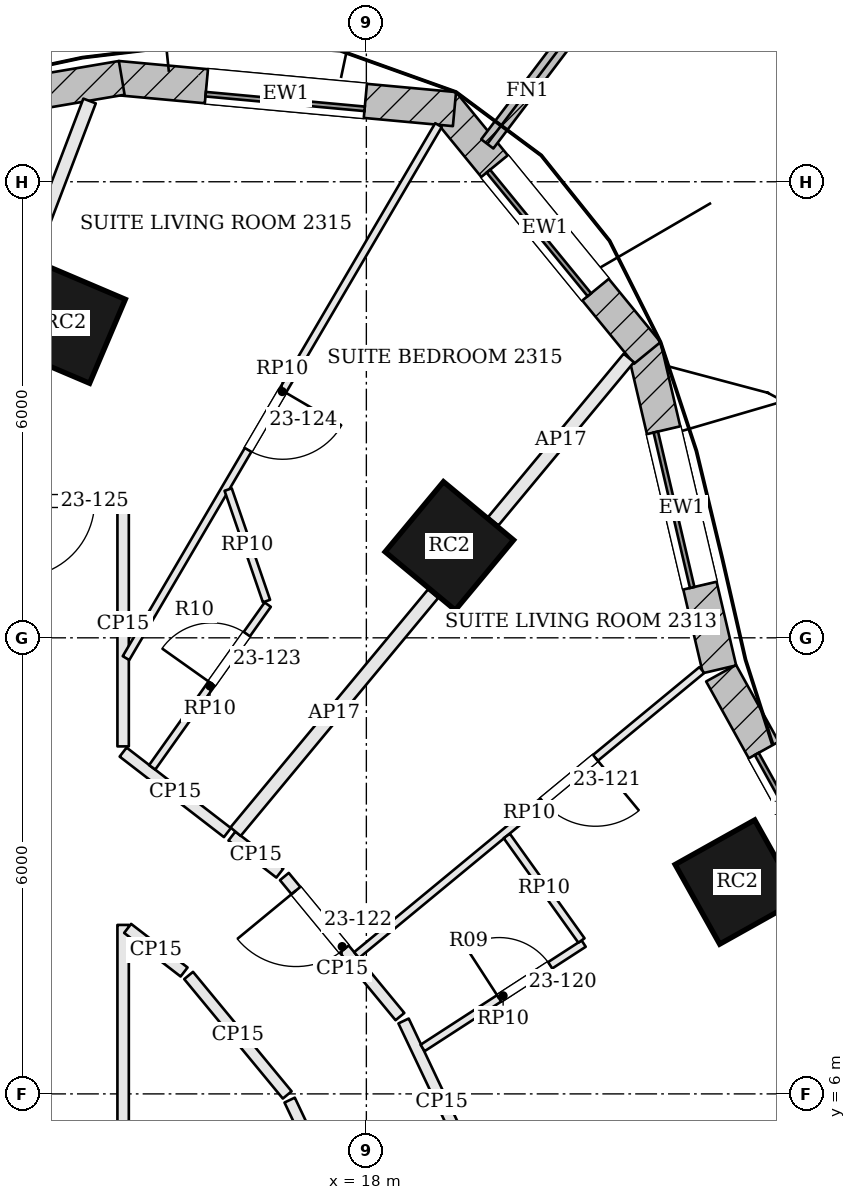
"""IFC4 building model, lengths in metres.
Left out: names, types, materials, properties, quantities, classifications, styles, units other than length and angle.
Written with IfcOpenShell. Run it as: python <this file> out.ifc"""

import sys

from ifc_helpers import new_model, si_unit, direction, frame, frame_2d, origin, origin_2d, place, context, subcontext, project, spatial, rectangle, extrude, element, fill, save


model = new_model("IFC4")
c1 = context("Model", 3, precision=1e-05, world=origin(), true_north=direction((0.0, 1.0)))
c2 = subcontext(c1, "Body", "Model", "MODEL_VIEW")
j1 = project(units=[si_unit("LENGTHUNIT", "METRE"), si_unit("PLANEANGLEUNIT", "RADIAN")], contexts=[c1])
p1 = place(None, origin())
s1 = spatial("IfcSite", under=j1, at=p1, CompositionType="ELEMENT")
p2 = place(p1, origin())
s2 = spatial("IfcBuilding", under=s1, at=p2, CompositionType="ELEMENT")
p3 = place(p2, frame((0.0, 0.0, 99.6)))
s3 = spatial("IfcBuildingStorey", under=s2, at=p3, CompositionType="ELEMENT", Elevation=99.6)
for number, where, z_axis, x_axis in (
    (1, (22.879, 8.787, 0.0), (0.0, 0.0, 1.0), (-0.489, 0.873, 0.0)),
    (2, (19.092, 13.209, 0.0), (0.0, 0.0, 1.0), (-0.769, 0.639, 0.0)),
    (3, (14.042, 16.136, 0.0), (0.0, 0.0, 1.0), (-0.92, 0.392, 0.0)),
):
    element("IfcColumn", number, at=place(p3, frame(where, z_axis=z_axis, x_axis=x_axis)), inside=s3, PredefinedType="COLUMN", context=c2, shape_type="SweptSolid", body=[
        extrude(rectangle(XDim=1.2, YDim=1.2, at=origin_2d()), origin(), (0.0, 0.0, 1.0), 3.6),
    ])
p4 = place(p3, frame((24.662, 7.939, 0.0), z_axis=(0.0, 0.0, 1.0), x_axis=(-0.485153910721, 0.874428775208, 0.0)))
e4 = element("IfcWall", 4, at=p4, inside=s3, PredefinedType="SOLIDWALL", context=c2, shape_type="SweptSolid", body=[
    extrude(rectangle(XDim=4.112, YDim=0.45, at=frame_2d((2.056, 0.0))), origin(), (0.0, 0.0, 1.0), 3.4),
])
p5 = place(p4, frame((1.156, 0.0, 0.9)))
e5 = element("IfcOpeningElement", 5, at=p5, cuts=e4, PredefinedType="OPENING", context=c2, shape_type="SweptSolid", body=[
    extrude(rectangle(XDim=1.8, YDim=2.0, at=frame_2d((0.9, 1.0))), frame((0.0, 0.235, 0.0), z_axis=(0.0, -1.0, 0.0), x_axis=(1.0, 0.0, 0.0)), (0.0, 0.0, 1.0), 0.47),
])
p6 = place(p3, frame((22.646, 11.586, 0.0), z_axis=(0.0, 0.0, 1.0), x_axis=(-0.227925124198, 0.973678662475, 0.0)))
e6 = element("IfcWall", 6, at=p6, inside=s3, PredefinedType="SOLIDWALL", context=c2, shape_type="SweptSolid", body=[
    extrude(rectangle(XDim=4.361, YDim=0.45, at=frame_2d((2.18, 0.0))), origin(), (0.0, 0.0, 1.0), 3.4),
])
p7 = place(p6, frame((1.13, 0.0, 0.9)))
e7 = element("IfcOpeningElement", 7, at=p7, cuts=e6, PredefinedType="OPENING", context=c2, shape_type="SweptSolid", body=[
    extrude(rectangle(XDim=2.1, YDim=2.0, at=frame_2d((1.05, 1.0))), frame((0.0, 0.235, 0.0), z_axis=(0.0, -1.0, 0.0), x_axis=(1.0, 0.0, 0.0)), (0.0, 0.0, 1.0), 0.47),
])
p8 = place(p3, frame((21.696, 15.748, 0.0), z_axis=(0.0, 0.0, 1.0), x_axis=(-0.632968710519, 0.774177377288, 0.0)))
e8 = element("IfcWall", 8, at=p8, inside=s3, PredefinedType="SOLIDWALL", context=c2, shape_type="SweptSolid", body=[
    extrude(rectangle(XDim=4.25, YDim=0.45, at=frame_2d((2.125, 0.0))), origin(), (0.0, 0.0, 1.0), 3.4),
])
p9 = place(p8, frame((1.075, 0.0, 0.9)))
e9 = element("IfcOpeningElement", 9, at=p9, cuts=e8, PredefinedType="OPENING", context=c2, shape_type="SweptSolid", body=[
    extrude(rectangle(XDim=2.1, YDim=2.0, at=frame_2d((1.05, 1.0))), frame((0.0, 0.235, 0.0), z_axis=(0.0, -1.0, 0.0), x_axis=(1.0, 0.0, 0.0)), (0.0, 0.0, 1.0), 0.47),
])
p10 = place(p3, frame((19.159, 18.956, 0.0), z_axis=(0.0, 0.0, 1.0), x_axis=(-0.995777399421, 0.091800712424, 0.0)))
e10 = element("IfcWall", 10, at=p10, inside=s3, PredefinedType="SOLIDWALL", context=c2, shape_type="SweptSolid", body=[
    extrude(rectangle(XDim=4.455, YDim=0.45, at=frame_2d((2.227, 0.0))), origin(), (0.0, 0.0, 1.0), 3.4),
])
p11 = place(p10, frame((1.177, 0.0, 0.9)))
e11 = element("IfcOpeningElement", 11, at=p11, cuts=e10, PredefinedType="OPENING", context=c2, shape_type="SweptSolid", body=[
    extrude(rectangle(XDim=2.1, YDim=2.0, at=frame_2d((1.05, 1.0))), frame((0.0, 0.235, 0.0), z_axis=(0.0, -1.0, 0.0), x_axis=(1.0, 0.0, 0.0)), (0.0, 0.0, 1.0), 0.47),
])
p12 = place(p3, frame((14.782, 19.367, 0.0), z_axis=(0.0, 0.0, 1.0), x_axis=(-0.98585584667, -0.167595493934, 0.0)))
e12 = element("IfcWall", 12, at=p12, inside=s3, PredefinedType="SOLIDWALL", context=c2, shape_type="SweptSolid", body=[
    extrude(rectangle(XDim=5.399, YDim=0.45, at=frame_2d((2.699, 0.0))), origin(), (0.0, 0.0, 1.0), 3.4),
])
p13 = place(p12, frame((1.649, 0.0, 0.9)))
e13 = element("IfcOpeningElement", 13, at=p13, cuts=e12, PredefinedType="OPENING", context=c2, shape_type="SweptSolid", body=[
    extrude(rectangle(XDim=2.1, YDim=2.0, at=frame_2d((1.05, 1.0))), frame((0.0, 0.235, 0.0), z_axis=(0.0, -1.0, 0.0), x_axis=(1.0, 0.0, 0.0)), (0.0, 0.0, 1.0), 0.47),
])
p14 = place(p3, frame((19.591, 18.498, 0.0), z_axis=(0.0, 0.0, 1.0), x_axis=(0.603387525063, 0.797448114048, 0.0)))
e14 = element("IfcWall", 14, at=p14, inside=s3, PredefinedType="SOLIDWALL", context=c2, shape_type="SweptSolid", body=[
    extrude(rectangle(XDim=1.75, YDim=0.2, at=frame_2d((0.875, 0.0))), origin(), (0.0, 0.0, 1.0), 3.4),
])
p15 = place(p3, frame((19.495, 4.836, 0.0), z_axis=(0.0, 0.0, 1.0), x_axis=(-0.428157819028, 0.903703979191, 0.0)))
e15 = element("IfcWall", 15, at=p15, inside=s3, PredefinedType="PARTITIONING", context=c2, shape_type="SweptSolid", body=[
    extrude(rectangle(XDim=2.349, YDim=0.15, at=frame_2d((1.175, 0.0))), origin(), (0.0, 0.0, 1.0), 2.784),
])
p16 = place(p3, frame((18.442, 7.017, 0.0), z_axis=(0.0, 0.0, 1.0), x_axis=(-0.636538018119, 0.7712453251, 0.0)))
e16 = element("IfcWall", 16, at=p16, inside=s3, PredefinedType="PARTITIONING", context=c2, shape_type="SweptSolid", body=[
    extrude(rectangle(XDim=2.389, YDim=0.15, at=frame_2d((1.194, 0.0))), origin(), (0.0, 0.0, 1.0), 2.784),
])
p17 = place(p16, frame((1.15, 0.0, 0.0)))
e17 = element("IfcOpeningElement", 17, at=p17, cuts=e16, PredefinedType="OPENING", context=c2, shape_type="SweptSolid", body=[
    extrude(rectangle(XDim=1.0, YDim=2.1, at=frame_2d((0.5, 1.05))), frame((0.0, 0.085, 0.0), z_axis=(0.0, -1.0, 0.0), x_axis=(1.0, 0.0, 0.0)), (0.0, 0.0, 1.0), 0.17),
])
p18 = place(p3, frame((16.862, 8.905, 0.0), z_axis=(0.0, 0.0, 1.0), x_axis=(-0.791460242133, 0.611220651748, 0.0)))
e18 = element("IfcWall", 18, at=p18, inside=s3, PredefinedType="PARTITIONING", context=c2, shape_type="SweptSolid", body=[
    extrude(rectangle(XDim=0.796, YDim=0.15, at=frame_2d((0.398, 0.0))), origin(), (0.0, 0.0, 1.0), 2.784),
])
p19 = place(p3, frame((21.453, 15.682, 0.0), z_axis=(0.0, 0.0, 1.0), x_axis=(-0.638728991457, -0.769431787407, 0.0)))
e19 = element("IfcWall", 19, at=p19, inside=s3, PredefinedType="PARTITIONING", context=c2, shape_type="SweptSolid", body=[
    extrude(rectangle(XDim=2.791, YDim=0.175, at=frame_2d((1.396, 0.0))), origin(), (0.0, 0.0, 1.0), 2.784),
])
p20 = place(p3, frame((18.878, 12.58, 0.0), z_axis=(0.0, 0.0, 1.0), x_axis=(-0.638737279584, -0.769424907102, 0.0)))
e20 = element("IfcWall", 20, at=p20, inside=s3, PredefinedType="PARTITIONING", context=c2, shape_type="SweptSolid", body=[
    extrude(rectangle(XDim=4.069, YDim=0.175, at=frame_2d((2.034, 0.0))), origin(), (0.0, 0.0, 1.0), 2.784),
])
p21 = place(p3, frame((16.172, 9.438, 0.0), z_axis=(0.0, 0.0, 1.0), x_axis=(-0.791607054889, 0.611030498952, 0.0)))
e21 = element("IfcWall", 21, at=p21, inside=s3, PredefinedType="PARTITIONING", context=c2, shape_type="SweptSolid", body=[
    extrude(rectangle(XDim=1.733, YDim=0.15, at=frame_2d((0.867, 0.0))), origin(), (0.0, 0.0, 1.0), 2.784),
])
p22 = place(p3, frame((14.8, 10.572, 0.0), z_axis=(0.0, 0.0, 1.0), x_axis=(0.0, 1.0, 0.0)))
e22 = element("IfcWall", 22, at=p22, inside=s3, PredefinedType="PARTITIONING", context=c2, shape_type="SweptSolid", body=[
    extrude(rectangle(XDim=3.228, YDim=0.15, at=frame_2d((1.614, 0.0))), origin(), (0.0, 0.0, 1.0), 2.784),
])
p23 = place(p3, frame((14.725, 13.8, 0.0), z_axis=(0.0, 0.0, 1.0), x_axis=(-1.0, 0.0, 0.0)))
e23 = element("IfcWall", 23, at=p23, inside=s3, PredefinedType="PARTITIONING", context=c2, shape_type="SweptSolid", body=[
    extrude(rectangle(XDim=2.37, YDim=0.15, at=frame_2d((1.185, 0.0))), origin(), (0.0, 0.0, 1.0), 2.784),
])
p24 = place(p23, frame((0.3, 0.0, 0.0)))
e24 = element("IfcOpeningElement", 24, at=p24, cuts=e23, PredefinedType="OPENING", context=c2, shape_type="SweptSolid", body=[
    extrude(rectangle(XDim=1.0, YDim=2.1, at=frame_2d((0.5, 1.05))), frame((0.0, 0.085, 0.0), z_axis=(0.0, -1.0, 0.0), x_axis=(1.0, 0.0, 0.0)), (0.0, 0.0, 1.0), 0.17),
])
p25 = place(p3, frame((14.359, 19.063, 0.0), z_axis=(0.0, 0.0, 1.0), x_axis=(-0.355746808742, -0.934582370939, 0.0)))
e25 = element("IfcWall", 25, at=p25, inside=s3, PredefinedType="PARTITIONING", context=c2, shape_type="SweptSolid", body=[
    extrude(rectangle(XDim=5.556, YDim=0.175, at=frame_2d((2.778, 0.0))), origin(), (0.0, 0.0, 1.0), 2.784),
])
p26 = place(p3, frame((15.662, 7.558, 0.0), z_axis=(0.0, 0.0, 1.0), x_axis=(0.636500564941, -0.7712762351, 0.0)))
e26 = element("IfcWall", 26, at=p26, inside=s3, PredefinedType="PARTITIONING", context=c2, shape_type="SweptSolid", body=[
    extrude(rectangle(XDim=2.038, YDim=0.15, at=frame_2d((1.019, 0.0))), origin(), (0.0, 0.0, 1.0), 2.784),
])
p27 = place(p3, frame((16.991, 5.918, 0.0), z_axis=(0.0, 0.0, 1.0), x_axis=(0.428199863362, -0.903684058185, 0.0)))
e27 = element("IfcWall", 27, at=p27, inside=s3, PredefinedType="PARTITIONING", context=c2, shape_type="SweptSolid", body=[
    extrude(rectangle(XDim=1.941, YDim=0.15, at=frame_2d((0.971, 0.0))), origin(), (0.0, 0.0, 1.0), 2.784),
])
p28 = place(p3, frame((14.8, -4.725, 0.0), z_axis=(0.0, 0.0, 1.0), x_axis=(0.0, 1.0, 0.0)))
e28 = element("IfcWall", 28, at=p28, inside=s3, PredefinedType="PARTITIONING", context=c2, shape_type="SweptSolid", body=[
    extrude(rectangle(XDim=12.948, YDim=0.15, at=frame_2d((6.474, 0.0))), origin(), (0.0, 0.0, 1.0), 2.784),
])
p29 = place(p28, frame((5.536, 0.0, 0.0)))
e29 = element("IfcOpeningElement", 29, at=p29, cuts=e28, PredefinedType="OPENING", context=c2, shape_type="SweptSolid", body=[
    extrude(rectangle(XDim=1.8, YDim=2.1, at=frame_2d((0.9, 1.05))), frame((0.0, 0.085, 0.0), z_axis=(0.0, -1.0, 0.0), x_axis=(1.0, 0.0, 0.0)), (0.0, 0.0, 1.0), 0.17),
])
p30 = place(p3, frame((14.859, 8.177, 0.0), z_axis=(0.0, 0.0, 1.0), x_axis=(0.791588113465, -0.611055037309, 0.0)))
e30 = element("IfcWall", 30, at=p30, inside=s3, PredefinedType="PARTITIONING", context=c2, shape_type="SweptSolid", body=[
    extrude(rectangle(XDim=0.938, YDim=0.15, at=frame_2d((0.469, 0.0))), origin(), (0.0, 0.0, 1.0), 2.784),
])
p31 = place(p3, frame((22.414, 11.576, 0.0), z_axis=(0.0, 0.0, 1.0), x_axis=(-0.77113161257, -0.636675769992, 0.0)))
e31 = element("IfcWall", 31, at=p31, inside=s3, PredefinedType="PARTITIONING", context=c2, shape_type="SweptSolid", body=[
    extrude(rectangle(XDim=5.89, YDim=0.1, at=frame_2d((2.945, 0.0))), origin(), (0.0, 0.0, 1.0), 2.784),
])
p32 = place(p31, frame((1.815, 0.0, 0.0)))
e32 = element("IfcOpeningElement", 32, at=p32, cuts=e31, PredefinedType="OPENING", context=c2, shape_type="SweptSolid", body=[
    extrude(rectangle(XDim=0.9, YDim=2.4, at=frame_2d((0.45, 1.2))), frame((0.0, 0.06, 0.0), z_axis=(0.0, -1.0, 0.0), x_axis=(1.0, 0.0, 0.0)), (0.0, 0.0, 1.0), 0.12),
])
p33 = place(p3, frame((18.74, 6.604, 0.0), z_axis=(0.0, 0.0, 1.0), x_axis=(0.839209373403, 0.543808447519, 0.0)))
e33 = element("IfcWall", 33, at=p33, inside=s3, PredefinedType="PARTITIONING", context=c2, shape_type="SweptSolid", body=[
    extrude(rectangle(XDim=2.525, YDim=0.1, at=frame_2d((1.262, 0.0))), origin(), (0.0, 0.0, 1.0), 2.784),
])
p34 = place(p33, frame((1.2, 0.0, 0.0)))
e34 = element("IfcOpeningElement", 34, at=p34, cuts=e33, PredefinedType="OPENING", context=c2, shape_type="SweptSolid", body=[
    extrude(rectangle(XDim=0.8, YDim=2.1, at=frame_2d((0.4, 1.05))), frame((0.0, 0.06, 0.0), z_axis=(0.0, -1.0, 0.0), x_axis=(1.0, 0.0, 0.0)), (0.0, 0.0, 1.0), 0.12),
])
p35 = place(p3, frame((20.83, 8.018, 0.0), z_axis=(0.0, 0.0, 1.0), x_axis=(-0.581347517166, 0.813655371939, 0.0)))
e35 = element("IfcWall", 35, at=p35, inside=s3, PredefinedType="PARTITIONING", context=c2, shape_type="SweptSolid", body=[
    extrude(rectangle(XDim=1.69, YDim=0.1, at=frame_2d((0.845, 0.0))), origin(), (0.0, 0.0, 1.0), 2.784),
])
p36 = place(p3, frame((18.949, 18.745, 0.0), z_axis=(0.0, 0.0, 1.0), x_axis=(-0.505754187447, -0.862677634972, 0.0)))
e36 = element("IfcWall", 36, at=p36, inside=s3, PredefinedType="PARTITIONING", context=c2, shape_type="SweptSolid", body=[
    extrude(rectangle(XDim=8.128, YDim=0.1, at=frame_2d((4.064, 0.0))), origin(), (0.0, 0.0, 1.0), 2.784),
])
p37 = place(p36, frame((4.053, 0.0, 0.0)))
e37 = element("IfcOpeningElement", 37, at=p37, cuts=e36, PredefinedType="OPENING", context=c2, shape_type="SweptSolid", body=[
    extrude(rectangle(XDim=0.9, YDim=2.4, at=frame_2d((0.45, 1.2))), frame((0.0, 0.06, 0.0), z_axis=(0.0, -1.0, 0.0), x_axis=(1.0, 0.0, 0.0)), (0.0, 0.0, 1.0), 0.12),
])
p38 = place(p3, frame((15.183, 10.296, 0.0), z_axis=(0.0, 0.0, 1.0), x_axis=(0.578992412459, 0.815332929738, 0.0)))
e38 = element("IfcWall", 38, at=p38, inside=s3, PredefinedType="PARTITIONING", context=c2, shape_type="SweptSolid", body=[
    extrude(rectangle(XDim=2.625, YDim=0.1, at=frame_2d((1.312, 0.0))), origin(), (0.0, 0.0, 1.0), 2.784),
])
p39 = place(p38, frame((1.35, 0.0, 0.0)))
e39 = element("IfcOpeningElement", 39, at=p39, cuts=e38, PredefinedType="OPENING", context=c2, shape_type="SweptSolid", body=[
    extrude(rectangle(XDim=0.8, YDim=2.1, at=frame_2d((0.4, 1.05))), frame((0.0, 0.06, 0.0), z_axis=(0.0, -1.0, 0.0), x_axis=(1.0, 0.0, 0.0)), (0.0, 0.0, 1.0), 0.12),
])
p40 = place(p3, frame((16.686, 12.484, 0.0), z_axis=(0.0, 0.0, 1.0), x_axis=(-0.325136945244, 0.94566694287, 0.0)))
e40 = element("IfcWall", 40, at=p40, inside=s3, PredefinedType="PARTITIONING", context=c2, shape_type="SweptSolid", body=[
    extrude(rectangle(XDim=1.551, YDim=0.1, at=frame_2d((0.776, 0.0))), origin(), (0.0, 0.0, 1.0), 2.784),
])
p41 = place(p5, origin())
e41 = element("IfcWindow", 41, at=p41, inside=s3, PartitioningType="SINGLE_PANEL", PredefinedType="WINDOW", context=c2, shape_type="SweptSolid", body=[
    extrude(rectangle(XDim=1.8, YDim=2.0, at=frame_2d((0.9, 1.0))), frame((0.0, 0.135, 0.0), z_axis=(0.0, -1.0, 0.0), x_axis=(1.0, 0.0, 0.0)), (0.0, 0.0, 1.0), 0.06),
])
fill(e5, e41)
p42 = place(p7, origin())
e42 = element("IfcWindow", 42, at=p42, inside=s3, PartitioningType="SINGLE_PANEL", PredefinedType="WINDOW", context=c2, shape_type="SweptSolid", body=[
    extrude(rectangle(XDim=2.1, YDim=2.0, at=frame_2d((1.05, 1.0))), frame((0.0, 0.135, 0.0), z_axis=(0.0, -1.0, 0.0), x_axis=(1.0, 0.0, 0.0)), (0.0, 0.0, 1.0), 0.06),
])
fill(e7, e42)
p43 = place(p9, origin())
e43 = element("IfcWindow", 43, at=p43, inside=s3, PartitioningType="SINGLE_PANEL", PredefinedType="WINDOW", context=c2, shape_type="SweptSolid", body=[
    extrude(rectangle(XDim=2.1, YDim=2.0, at=frame_2d((1.05, 1.0))), frame((0.0, 0.135, 0.0), z_axis=(0.0, -1.0, 0.0), x_axis=(1.0, 0.0, 0.0)), (0.0, 0.0, 1.0), 0.06),
])
fill(e9, e43)
p44 = place(p11, origin())
e44 = element("IfcWindow", 44, at=p44, inside=s3, PartitioningType="SINGLE_PANEL", PredefinedType="WINDOW", context=c2, shape_type="SweptSolid", body=[
    extrude(rectangle(XDim=2.1, YDim=2.0, at=frame_2d((1.05, 1.0))), frame((0.0, 0.135, 0.0), z_axis=(0.0, -1.0, 0.0), x_axis=(1.0, 0.0, 0.0)), (0.0, 0.0, 1.0), 0.06),
])
fill(e11, e44)
p45 = place(p34, origin())
e45 = element("IfcDoor", 45, at=p45, inside=s3, OperationType="SINGLE_SWING_LEFT", PredefinedType="DOOR", context=c2, shape_type="SweptSolid", body=[
    extrude(rectangle(XDim=0.8, YDim=2.1, at=frame_2d((0.4, 1.05))), frame((0.0, 0.025, 0.0), z_axis=(0.0, -1.0, 0.0), x_axis=(1.0, 0.0, 0.0)), (0.0, 0.0, 1.0), 0.05),
])
fill(e34, e45)
p46 = place(p32, origin())
e46 = element("IfcDoor", 46, at=p46, inside=s3, OperationType="SINGLE_SWING_LEFT", PredefinedType="DOOR", context=c2, shape_type="SweptSolid", body=[
    extrude(rectangle(XDim=0.9, YDim=2.4, at=frame_2d((0.45, 1.2))), frame((0.0, 0.025, 0.0), z_axis=(0.0, -1.0, 0.0), x_axis=(1.0, 0.0, 0.0)), (0.0, 0.0, 1.0), 0.05),
])
fill(e32, e46)
p47 = place(p17, origin())
e47 = element("IfcDoor", 47, at=p47, inside=s3, OperationType="SINGLE_SWING_RIGHT", PredefinedType="DOOR", context=c2, shape_type="SweptSolid", body=[
    extrude(rectangle(XDim=1.0, YDim=2.1, at=frame_2d((0.5, 1.05))), frame((0.0, 0.025, 0.0), z_axis=(0.0, -1.0, 0.0), x_axis=(1.0, 0.0, 0.0)), (0.0, 0.0, 1.0), 0.05),
])
fill(e17, e47)
p48 = place(p39, origin())
e48 = element("IfcDoor", 48, at=p48, inside=s3, OperationType="SINGLE_SWING_LEFT", PredefinedType="DOOR", context=c2, shape_type="SweptSolid", body=[
    extrude(rectangle(XDim=0.8, YDim=2.1, at=frame_2d((0.4, 1.05))), frame((0.0, 0.025, 0.0), z_axis=(0.0, -1.0, 0.0), x_axis=(1.0, 0.0, 0.0)), (0.0, 0.0, 1.0), 0.05),
])
fill(e39, e48)
p49 = place(p37, origin())
e49 = element("IfcDoor", 49, at=p49, inside=s3, OperationType="SINGLE_SWING_LEFT", PredefinedType="DOOR", context=c2, shape_type="SweptSolid", body=[
    extrude(rectangle(XDim=0.9, YDim=2.4, at=frame_2d((0.45, 1.2))), frame((0.0, 0.025, 0.0), z_axis=(0.0, -1.0, 0.0), x_axis=(1.0, 0.0, 0.0)), (0.0, 0.0, 1.0), 0.05),
])
fill(e37, e49)
p50 = place(p24, origin())
e50 = element("IfcDoor", 50, at=p50, inside=s3, OperationType="SINGLE_SWING_RIGHT", PredefinedType="DOOR", context=c2, shape_type="SweptSolid", body=[
    extrude(rectangle(XDim=1.0, YDim=2.1, at=frame_2d((0.5, 1.05))), frame((0.0, 0.025, 0.0), z_axis=(0.0, -1.0, 0.0), x_axis=(1.0, 0.0, 0.0)), (0.0, 0.0, 1.0), 0.05),
])
fill(e24, e50)
save(model, sys.argv[1])
